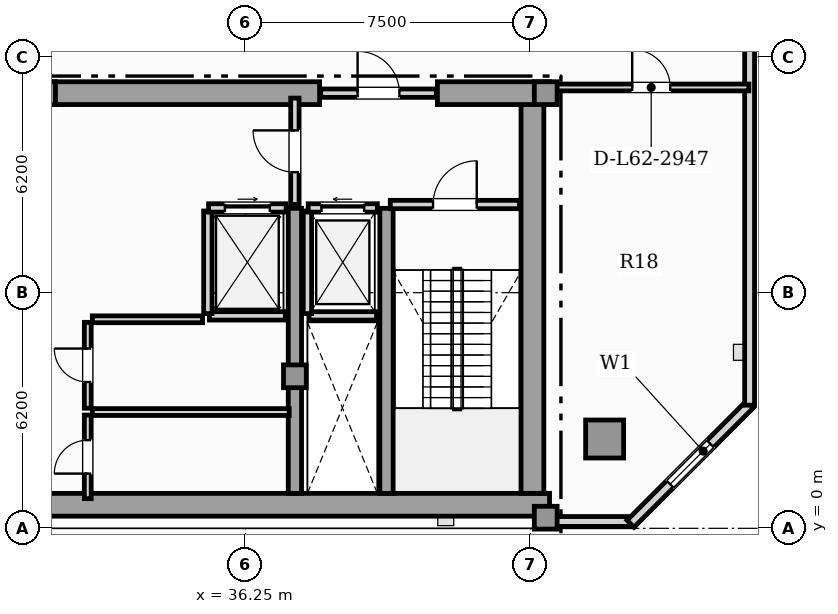
"""IFC4 building model, lengths in metres.
Left out: names, types, materials, properties, quantities, classifications, styles, units other than length and angle.
Written with IfcOpenShell. Run it as: python <this file> out.ifc"""

import sys

from ifc_helpers import new_model, si_unit, direction, frame, frame_2d, origin, origin_2d, place, context, subcontext, project, spatial, rectangle, hollow_rectangle, extrude, element, fill, save


model = new_model("IFC4")
c1 = context("Model", 3, precision=1e-05, world=origin(), true_north=direction((0.0, 1.0)))
c2 = subcontext(c1, "Body", "Model", "MODEL_VIEW")
j1 = project(units=[si_unit("LENGTHUNIT", "METRE"), si_unit("PLANEANGLEUNIT", "RADIAN")], contexts=[c1])
p1 = place(None, origin())
s1 = spatial("IfcSite", under=j1, at=p1, CompositionType="ELEMENT")
p2 = place(p1, origin())
s2 = spatial("IfcBuilding", under=s1, at=p2, CompositionType="ELEMENT")
p3 = place(p2, frame((0.0, 0.0, 251.7)))
s3 = spatial("IfcBuildingStorey", under=s2, at=p3, CompositionType="ELEMENT", Elevation=251.7)
p4 = place(p3, frame((13.25, 0.62, 0.0), z_axis=(0.0, 0.0, 1.0), x_axis=(1.0, 0.0, 0.0)))
e1 = element("IfcWall", 1, at=p4, inside=s3, PredefinedType="SHEAR", context=c2, shape_type="SweptSolid", body=[
    extrude(rectangle(XDim=31.0, YDim=0.6, at=frame_2d((15.5, 0.0))), origin(), (0.0, 0.0, 1.0), 4.85),
])
p5 = place(p3, frame((43.8, 0.92, 0.0), z_axis=(0.0, 0.0, 1.0), x_axis=(0.0, 1.0, 0.0)))
e2 = element("IfcWall", 2, at=p5, inside=s3, PredefinedType="SHEAR", context=c2, shape_type="SweptSolid", body=[
    extrude(rectangle(XDim=10.53, YDim=0.6, at=frame_2d((5.265, 0.0))), origin(), (0.0, 0.0, 1.0), 4.85),
])
p6 = place(p3, frame((30.9, 11.45, 0.0), z_axis=(0.0, 0.0, 1.0), x_axis=(1.0, 0.0, 0.0)))
e3 = element("IfcWall", 3, at=p6, inside=s3, PredefinedType="SHEAR", context=c2, shape_type="SweptSolid", body=[
    extrude(rectangle(XDim=7.3, YDim=0.6, at=frame_2d((3.65, 0.0))), origin(), (0.0, 0.0, 1.0), 4.85),
])
p7 = place(p3, frame((41.3, 11.45, 0.0), z_axis=(0.0, 0.0, 1.0), x_axis=(1.0, 0.0, 0.0)))
e4 = element("IfcWall", 4, at=p7, inside=s3, PredefinedType="SHEAR", context=c2, shape_type="SweptSolid", body=[
    extrude(rectangle(XDim=2.95, YDim=0.6, at=frame_2d((1.475, 0.0))), origin(), (0.0, 0.0, 1.0), 4.85),
])
for number, where, z_axis, x_axis in (
    (5, (37.55, 0.92, 0.0), (0.0, 0.0, 1.0), (0.0, 1.0, 0.0)),
    (6, (39.96, 0.92, 0.0), (0.0, 0.0, 1.0), (0.0, 1.0, 0.0)),
):
    element("IfcWall", number, at=place(p3, frame(where, z_axis=z_axis, x_axis=x_axis)), inside=s3, PredefinedType="SHEAR", context=c2, shape_type="SweptSolid", body=[
        extrude(rectangle(XDim=7.5, YDim=0.35, at=frame_2d((3.75, 0.0))), origin(), (0.0, 0.0, 1.0), 4.85),
    ])
for number, where, z_axis, x_axis in (
    (7, (44.15, 0.28, 0.0), (0.0, 0.0, 1.0), (1.0, 0.0, 0.0)),
    (8, (44.15, 11.45, 0.0), (0.0, 0.0, 1.0), (1.0, 0.0, 0.0)),
    (9, (37.55, 4.0, 0.0), (0.0, 0.0, 1.0), (1.0, 0.0, 0.0)),
    (10, (30.95, 11.45, 0.0), (0.0, 0.0, 1.0), (1.0, 0.0, 0.0)),
):
    element("IfcColumn", number, at=place(p3, frame(where, z_axis=z_axis, x_axis=x_axis)), inside=s3, PredefinedType="COLUMN", context=c2, shape_type="SweptSolid", body=[
        extrude(rectangle(XDim=0.6, YDim=0.6, at=origin_2d()), origin(), (0.0, 0.0, 1.0), 5.05),
    ])
p8 = place(p3, frame((45.7, 2.35, 0.0), z_axis=(0.0, 0.0, 1.0), x_axis=(1.0, 0.0, 0.0)))
e11 = element("IfcColumn", 11, at=p8, inside=s3, PredefinedType="USERDEFINED", context=c2, shape_type="SweptSolid", body=[
    extrude(hollow_rectangle(XDim=1.0, YDim=1.0, WallThickness=0.06, at=origin_2d()), origin(), (0.0, 0.0, 1.0), 5.05),
])
p9 = place(p3, frame((44.25, 0.18, 0.0), z_axis=(0.0, 0.0, 1.0), x_axis=(1.0, 0.0, 0.0)))
e12 = element("IfcWall", 12, at=p9, inside=s3, PredefinedType="SOLIDWALL", context=c2, shape_type="SweptSolid", body=[
    extrude(rectangle(XDim=2.155, YDim=0.26, at=frame_2d((1.077, 0.0))), origin(), (0.0, 0.0, 1.0), 4.85),
])
p10 = place(p3, frame((46.381, 0.12, 0.0), z_axis=(0.0, 0.0, 1.0), x_axis=(0.707106781187, 0.707106781187, 0.0)))
e13 = element("IfcWall", 13, at=p10, inside=s3, PredefinedType="SOLIDWALL", context=c2, shape_type="SweptSolid", body=[
    extrude(rectangle(XDim=4.446, YDim=0.26, at=frame_2d((2.223, 0.0))), origin(), (0.0, 0.0, 1.0), 4.85),
])
p11 = place(p10, frame((1.473, 0.0, 0.9)))
e14 = element("IfcOpeningElement", 14, at=p11, cuts=e13, PredefinedType="OPENING", context=c2, shape_type="SweptSolid", body=[
    extrude(rectangle(XDim=1.5, YDim=1.95, at=frame_2d((0.75, 0.975))), frame((0.0, 0.14, 0.0), z_axis=(0.0, -1.0, 0.0), x_axis=(1.0, 0.0, 0.0)), (0.0, 0.0, 1.0), 0.28),
])
p12 = place(p3, frame((49.514, 3.24, 0.0), z_axis=(0.0, 0.0, 1.0), x_axis=(0.0, 1.0, 0.0)))
e15 = element("IfcWall", 15, at=p12, inside=s3, PredefinedType="SOLIDWALL", context=c2, shape_type="SweptSolid", body=[
    extrude(rectangle(XDim=29.692, YDim=0.26, at=frame_2d((14.846, 0.0))), origin(), (0.0, 0.0, 1.0), 4.85),
])
p13 = place(p12, frame((24.06, 0.0, 0.95)))
e16 = element("IfcOpeningElement", 16, at=p13, cuts=e15, PredefinedType="OPENING", context=c2, shape_type="SweptSolid", body=[
    extrude(rectangle(XDim=0.9, YDim=1.5, at=frame_2d((0.45, 0.75))), frame((0.0, 0.14, 0.0), z_axis=(0.0, -1.0, 0.0), x_axis=(1.0, 0.0, 0.0)), (0.0, 0.0, 1.0), 0.28),
])
p14 = place(p12, frame((10.25, 0.0, 0.9)))
e17 = element("IfcOpeningElement", 17, at=p14, cuts=e15, PredefinedType="OPENING", context=c2, shape_type="SweptSolid", body=[
    extrude(rectangle(XDim=1.5, YDim=1.95, at=frame_2d((0.75, 0.975))), frame((0.0, 0.14, 0.0), z_axis=(0.0, -1.0, 0.0), x_axis=(1.0, 0.0, 0.0)), (0.0, 0.0, 1.0), 0.28),
])
p15 = place(p12, frame((17.315, 0.0, 0.9)))
e18 = element("IfcOpeningElement", 18, at=p15, cuts=e15, PredefinedType="OPENING", context=c2, shape_type="SweptSolid", body=[
    extrude(rectangle(XDim=1.5, YDim=1.95, at=frame_2d((0.75, 0.975))), frame((0.0, 0.14, 0.0), z_axis=(0.0, -1.0, 0.0), x_axis=(1.0, 0.0, 0.0)), (0.0, 0.0, 1.0), 0.28),
])
p16 = place(p12, frame((26.061, 0.0, 0.9)))
e19 = element("IfcOpeningElement", 19, at=p16, cuts=e15, PredefinedType="OPENING", context=c2, shape_type="SweptSolid", body=[
    extrude(rectangle(XDim=1.5, YDim=1.95, at=frame_2d((0.75, 0.975))), frame((0.0, 0.14, 0.0), z_axis=(0.0, -1.0, 0.0), x_axis=(1.0, 0.0, 0.0)), (0.0, 0.0, 1.0), 0.28),
])
p17 = place(p3, frame((37.92, 5.59, 0.0), z_axis=(0.0, 0.0, 1.0), x_axis=(1.0, 0.0, 0.0)))
e20 = element("IfcWall", 20, at=p17, inside=s3, PredefinedType="SOLIDWALL", context=c2, shape_type="SweptSolid", body=[
    extrude(rectangle(XDim=1.78, YDim=0.22, at=frame_2d((0.89, 0.0))), origin(), (0.0, 0.0, 1.0), 4.85),
])
p18 = place(p3, frame((37.88, 5.65, 0.0), z_axis=(0.0, 0.0, 1.0), x_axis=(0.0, 1.0, 0.0)))
e21 = element("IfcWall", 21, at=p18, inside=s3, PredefinedType="SOLIDWALL", context=c2, shape_type="SweptSolid", body=[
    extrude(rectangle(XDim=2.7, YDim=0.22, at=frame_2d((1.35, 0.0))), origin(), (0.0, 0.0, 1.0), 4.85),
])
p19 = place(p3, frame((37.9, 8.43, 0.0), z_axis=(0.0, 0.0, 1.0), x_axis=(1.0, 0.0, 0.0)))
e22 = element("IfcWall", 22, at=p19, inside=s3, PredefinedType="SOLIDWALL", context=c2, shape_type="SweptSolid", body=[
    extrude(rectangle(XDim=1.82, YDim=0.22, at=frame_2d((0.91, 0.0))), origin(), (0.0, 0.0, 1.0), 4.85),
])
p20 = place(p19, frame((0.35, 0.0, 0.0)))
e23 = element("IfcOpeningElement", 23, at=p20, cuts=e22, PredefinedType="OPENING", context=c2, shape_type="SweptSolid", body=[
    extrude(rectangle(XDim=1.12, YDim=2.25, at=frame_2d((0.56, 1.125))), frame((0.0, 0.12, 0.0), z_axis=(0.0, -1.0, 0.0), x_axis=(1.0, 0.0, 0.0)), (0.0, 0.0, 1.0), 0.24),
])
p21 = place(p3, frame((35.3, 5.59, 0.0), z_axis=(0.0, 0.0, 1.0), x_axis=(1.0, 0.0, 0.0)))
e24 = element("IfcWall", 24, at=p21, inside=s3, PredefinedType="SOLIDWALL", context=c2, shape_type="SweptSolid", body=[
    extrude(rectangle(XDim=2.0, YDim=0.22, at=frame_2d((1.0, 0.0))), origin(), (0.0, 0.0, 1.0), 4.85),
])
p22 = place(p3, frame((35.26, 5.65, 0.0), z_axis=(0.0, 0.0, 1.0), x_axis=(0.0, 1.0, 0.0)))
e25 = element("IfcWall", 25, at=p22, inside=s3, PredefinedType="SOLIDWALL", context=c2, shape_type="SweptSolid", body=[
    extrude(rectangle(XDim=2.7, YDim=0.22, at=frame_2d((1.35, 0.0))), origin(), (0.0, 0.0, 1.0), 4.85),
])
p23 = place(p3, frame((35.28, 8.43, 0.0), z_axis=(0.0, 0.0, 1.0), x_axis=(1.0, 0.0, 0.0)))
e26 = element("IfcWall", 26, at=p23, inside=s3, PredefinedType="SOLIDWALL", context=c2, shape_type="SweptSolid", body=[
    extrude(rectangle(XDim=2.04, YDim=0.22, at=frame_2d((1.02, 0.0))), origin(), (0.0, 0.0, 1.0), 4.85),
])
p24 = place(p23, frame((0.43, 0.0, 0.0)))
e27 = element("IfcOpeningElement", 27, at=p24, cuts=e26, PredefinedType="OPENING", context=c2, shape_type="SweptSolid", body=[
    extrude(rectangle(XDim=1.18, YDim=2.2, at=frame_2d((0.59, 1.1))), frame((0.0, 0.12, 0.0), z_axis=(0.0, -1.0, 0.0), x_axis=(1.0, 0.0, 0.0)), (0.0, 0.0, 1.0), 0.24),
])
p25 = place(p3, frame((40.06, 8.52, 0.0), z_axis=(0.0, 0.0, 1.0), x_axis=(1.0, 0.0, 0.0)))
e28 = element("IfcWall", 28, at=p25, inside=s3, PredefinedType="SOLIDWALL", context=c2, shape_type="SweptSolid", body=[
    extrude(rectangle(XDim=3.4, YDim=0.22, at=frame_2d((1.7, 0.0))), origin(), (0.0, 0.0, 1.0), 4.85),
])
p26 = place(p25, frame((1.125, 0.0, 0.0)))
e29 = element("IfcOpeningElement", 29, at=p26, cuts=e28, PredefinedType="OPENING", context=c2, shape_type="SweptSolid", body=[
    extrude(rectangle(XDim=1.15, YDim=2.2, at=frame_2d((0.575, 1.1))), frame((0.0, 0.12, 0.0), z_axis=(0.0, -1.0, 0.0), x_axis=(1.0, 0.0, 0.0)), (0.0, 0.0, 1.0), 0.24),
])
p27 = place(p3, frame((37.55, 8.52, 0.0), z_axis=(0.0, 0.0, 1.0), x_axis=(0.0, 1.0, 0.0)))
e30 = element("IfcWall", 30, at=p27, inside=s3, PredefinedType="SOLIDWALL", context=c2, shape_type="SweptSolid", body=[
    extrude(rectangle(XDim=2.8, YDim=0.22, at=frame_2d((1.4, 0.0))), origin(), (0.0, 0.0, 1.0), 4.306),
])
p28 = place(p27, frame((0.85, 0.0, 0.0)))
e31 = element("IfcOpeningElement", 31, at=p28, cuts=e30, PredefinedType="OPENING", context=c2, shape_type="SweptSolid", body=[
    extrude(rectangle(XDim=1.1, YDim=2.2, at=frame_2d((0.55, 1.1))), frame((0.0, 0.12, 0.0), z_axis=(0.0, -1.0, 0.0), x_axis=(1.0, 0.0, 0.0)), (0.0, 0.0, 1.0), 0.24),
])
p29 = place(p3, frame((38.23, 11.45, 0.0), z_axis=(0.0, 0.0, 1.0), x_axis=(1.0, 0.0, 0.0)))
e32 = element("IfcWall", 32, at=p29, inside=s3, PredefinedType="SOLIDWALL", context=c2, shape_type="SweptSolid", body=[
    extrude(rectangle(XDim=3.04, YDim=0.22, at=frame_2d((1.52, 0.0))), origin(), (0.0, 0.0, 1.0), 4.85),
])
p30 = place(p29, frame((0.97, 0.0, 0.0)))
e33 = element("IfcOpeningElement", 33, at=p30, cuts=e32, PredefinedType="OPENING", context=c2, shape_type="SweptSolid", body=[
    extrude(rectangle(XDim=1.1, YDim=2.2, at=frame_2d((0.55, 1.1))), frame((0.0, 0.12, 0.0), z_axis=(0.0, -1.0, 0.0), x_axis=(1.0, 0.0, 0.0)), (0.0, 0.0, 1.0), 0.24),
])
p31 = place(p3, frame((32.1, 0.78, 0.0), z_axis=(0.0, 0.0, 1.0), x_axis=(0.0, 1.0, 0.0)))
e34 = element("IfcWall", 34, at=p31, inside=s3, PredefinedType="PARTITIONING", context=c2, shape_type="SweptSolid", body=[
    extrude(rectangle(XDim=2.2, YDim=0.18, at=frame_2d((1.1, 0.0))), origin(), (0.0, 0.0, 1.0), 4.85),
])
p32 = place(p31, frame((0.66, 0.0, 0.0)))
e35 = element("IfcOpeningElement", 35, at=p32, cuts=e34, PredefinedType="OPENING", context=c2, shape_type="SweptSolid", body=[
    extrude(rectangle(XDim=0.88, YDim=2.05, at=frame_2d((0.44, 1.025))), frame((0.0, 0.1, 0.0), z_axis=(0.0, -1.0, 0.0), x_axis=(1.0, 0.0, 0.0)), (0.0, 0.0, 1.0), 0.2),
])
p33 = place(p3, frame((32.22, 3.06, 0.0), z_axis=(0.0, 0.0, 1.0), x_axis=(1.0, 0.0, 0.0)))
e36 = element("IfcWall", 36, at=p33, inside=s3, PredefinedType="PARTITIONING", context=c2, shape_type="SweptSolid", body=[
    extrude(rectangle(XDim=5.18, YDim=0.18, at=frame_2d((2.59, 0.0))), origin(), (0.0, 0.0, 1.0), 4.85),
])
p34 = place(p3, frame((32.1, 3.16, 0.0), z_axis=(0.0, 0.0, 1.0), x_axis=(0.0, 1.0, 0.0)))
e37 = element("IfcWall", 37, at=p34, inside=s3, PredefinedType="PARTITIONING", context=c2, shape_type="SweptSolid", body=[
    extrude(rectangle(XDim=2.26, YDim=0.18, at=frame_2d((1.13, 0.0))), origin(), (0.0, 0.0, 1.0), 4.85),
])
p35 = place(p34, frame((0.69, 0.0, 0.0)))
e38 = element("IfcOpeningElement", 38, at=p35, cuts=e37, PredefinedType="OPENING", context=c2, shape_type="SweptSolid", body=[
    extrude(rectangle(XDim=0.88, YDim=2.05, at=frame_2d((0.44, 1.025))), frame((0.0, 0.1, 0.0), z_axis=(0.0, -1.0, 0.0), x_axis=(1.0, 0.0, 0.0)), (0.0, 0.0, 1.0), 0.2),
])
p36 = place(p3, frame((32.22, 5.5, 0.0), z_axis=(0.0, 0.0, 1.0), x_axis=(1.0, 0.0, 0.0)))
e39 = element("IfcWall", 39, at=p36, inside=s3, PredefinedType="PARTITIONING", context=c2, shape_type="SweptSolid", body=[
    extrude(rectangle(XDim=2.9, YDim=0.18, at=frame_2d((1.45, 0.0))), origin(), (0.0, 0.0, 1.0), 4.85),
])
p37 = place(p3, frame((44.355, 11.6, 0.0), z_axis=(0.0, 0.0, 1.0), x_axis=(1.0, 0.0, 0.0)))
e40 = element("IfcWall", 40, at=p37, inside=s3, PredefinedType="PARTITIONING", context=c2, shape_type="SweptSolid", body=[
    extrude(rectangle(XDim=5.14, YDim=0.18, at=frame_2d((2.57, 0.0))), origin(), (0.0, 0.0, 1.0), 4.85),
])
p38 = place(p37, frame((2.07, 0.0, 0.0)))
e41 = element("IfcOpeningElement", 41, at=p38, cuts=e40, PredefinedType="OPENING", context=c2, shape_type="SweptSolid", body=[
    extrude(rectangle(XDim=1.0, YDim=2.15, at=frame_2d((0.5, 1.075))), frame((0.0, 0.1, 0.0), z_axis=(0.0, -1.0, 0.0), x_axis=(1.0, 0.0, 0.0)), (0.0, 0.0, 1.0), 0.2),
])
p39 = place(p11, origin())
e42 = element("IfcWindow", 42, at=p39, inside=s3, PartitioningType="SINGLE_PANEL", PredefinedType="WINDOW", context=c2, shape_type="SweptSolid", body=[
    extrude(rectangle(XDim=1.5, YDim=1.95, at=frame_2d((0.75, 0.975))), frame((0.0, 0.03, 0.0), z_axis=(0.0, -1.0, 0.0), x_axis=(1.0, 0.0, 0.0)), (0.0, 0.0, 1.0), 0.06),
])
fill(e14, e42)
p40 = place(p20, origin())
e43 = element("IfcDoor", 43, at=p40, inside=s3, OperationType="SLIDING_TO_LEFT", PredefinedType="DOOR", context=c2, shape_type="SweptSolid", body=[
    extrude(rectangle(XDim=1.12, YDim=2.25, at=frame_2d((0.56, 1.125))), frame((0.0, 0.025, 0.0), z_axis=(0.0, -1.0, 0.0), x_axis=(1.0, 0.0, 0.0)), (0.0, 0.0, 1.0), 0.05),
])
fill(e23, e43)
p41 = place(p24, origin())
e44 = element("IfcDoor", 44, at=p41, inside=s3, OperationType="SLIDING_TO_RIGHT", PredefinedType="DOOR", context=c2, shape_type="SweptSolid", body=[
    extrude(rectangle(XDim=1.18, YDim=2.2, at=frame_2d((0.59, 1.1))), frame((0.0, 0.025, 0.0), z_axis=(0.0, -1.0, 0.0), x_axis=(1.0, 0.0, 0.0)), (0.0, 0.0, 1.0), 0.05),
])
fill(e27, e44)
p42 = place(p26, origin())
e45 = element("IfcDoor", 45, at=p42, inside=s3, OperationType="SINGLE_SWING_RIGHT", PredefinedType="DOOR", context=c2, shape_type="SweptSolid", body=[
    extrude(rectangle(XDim=1.15, YDim=2.2, at=frame_2d((0.575, 1.1))), frame((0.0, 0.025, 0.0), z_axis=(0.0, -1.0, 0.0), x_axis=(1.0, 0.0, 0.0)), (0.0, 0.0, 1.0), 0.05),
])
fill(e29, e45)
p43 = place(p28, origin())
e46 = element("IfcDoor", 46, at=p43, inside=s3, OperationType="SINGLE_SWING_RIGHT", PredefinedType="DOOR", context=c2, shape_type="SweptSolid", body=[
    extrude(rectangle(XDim=1.1, YDim=2.2, at=frame_2d((0.55, 1.1))), frame((0.0, 0.025, 0.0), z_axis=(0.0, -1.0, 0.0), x_axis=(1.0, 0.0, 0.0)), (0.0, 0.0, 1.0), 0.05),
])
fill(e31, e46)
p44 = place(p30, origin())
e47 = element("IfcDoor", 47, at=p44, inside=s3, OperationType="SINGLE_SWING_LEFT", PredefinedType="DOOR", context=c2, shape_type="SweptSolid", body=[
    extrude(rectangle(XDim=1.1, YDim=2.2, at=frame_2d((0.55, 1.1))), frame((0.0, 0.025, 0.0), z_axis=(0.0, -1.0, 0.0), x_axis=(1.0, 0.0, 0.0)), (0.0, 0.0, 1.0), 0.05),
])
fill(e33, e47)
p45 = place(p32, origin())
e48 = element("IfcDoor", 48, at=p45, inside=s3, OperationType="SINGLE_SWING_LEFT", PredefinedType="DOOR", context=c2, shape_type="SweptSolid", body=[
    extrude(rectangle(XDim=0.88, YDim=2.05, at=frame_2d((0.44, 1.025))), frame((0.0, 0.025, 0.0), z_axis=(0.0, -1.0, 0.0), x_axis=(1.0, 0.0, 0.0)), (0.0, 0.0, 1.0), 0.05),
])
fill(e35, e48)
p46 = place(p35, origin())
e49 = element("IfcDoor", 49, at=p46, inside=s3, OperationType="SINGLE_SWING_RIGHT", PredefinedType="DOOR", context=c2, shape_type="SweptSolid", body=[
    extrude(rectangle(XDim=0.88, YDim=2.05, at=frame_2d((0.44, 1.025))), frame((0.0, 0.025, 0.0), z_axis=(0.0, -1.0, 0.0), x_axis=(1.0, 0.0, 0.0)), (0.0, 0.0, 1.0), 0.05),
])
fill(e38, e49)
p47 = place(p38, origin())
e50 = element("IfcDoor", 50, at=p47, inside=s3, OperationType="SINGLE_SWING_LEFT", PredefinedType="DOOR", context=c2, shape_type="SweptSolid", body=[
    extrude(rectangle(XDim=1.0, YDim=2.15, at=frame_2d((0.5, 1.075))), frame((0.0, 0.025, 0.0), z_axis=(0.0, -1.0, 0.0), x_axis=(1.0, 0.0, 0.0)), (0.0, 0.0, 1.0), 0.05),
])
fill(e41, e50)
save(model, sys.argv[1])
